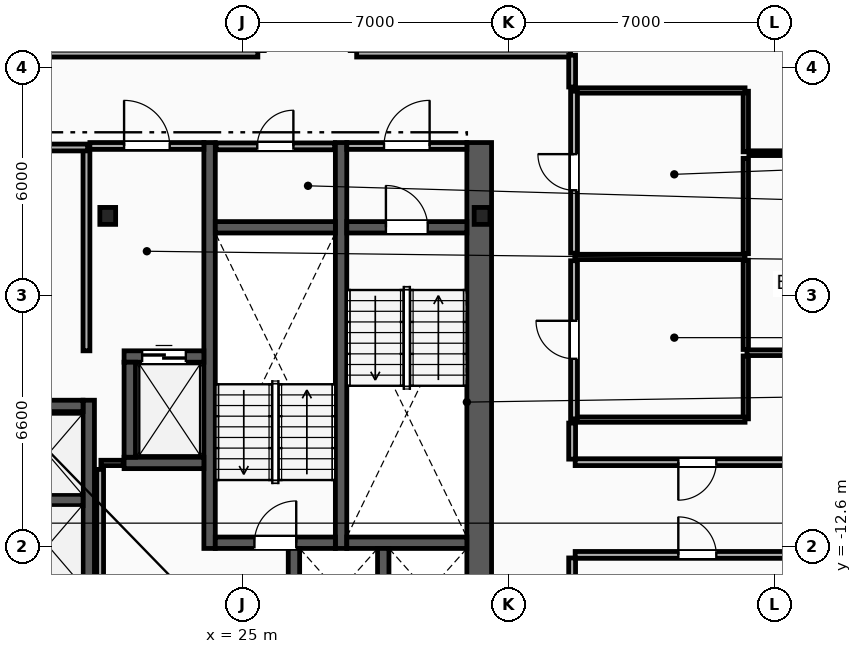
"""IFC4 building model, lengths in metres.
Left out: names, types, materials, properties, quantities, classifications, styles, units other than length and angle.
Written with IfcOpenShell. Run it as: python <this file> out.ifc"""

import sys

from ifc_helpers import new_model, si_unit, direction, frame, frame_2d, origin, origin_2d, place, context, subcontext, project, spatial, rectangle, i_section, extrude, element, fill, save


model = new_model("IFC4")
c1 = context("Model", 3, precision=1e-05, world=origin(), true_north=direction((0.0, 1.0)))
c2 = subcontext(c1, "Body", "Model", "MODEL_VIEW")
j1 = project(units=[si_unit("LENGTHUNIT", "METRE"), si_unit("PLANEANGLEUNIT", "RADIAN")], contexts=[c1])
p1 = place(None, origin())
s1 = spatial("IfcSite", under=j1, at=p1, CompositionType="ELEMENT")
p2 = place(p1, origin())
s2 = spatial("IfcBuilding", under=s1, at=p2, CompositionType="ELEMENT")
p3 = place(p2, frame((0.0, 0.0, 213.4)))
s3 = spatial("IfcBuildingStorey", under=s2, at=p3, CompositionType="ELEMENT", Elevation=213.4)
for number, where, z_axis, x_axis in (
    (1, (31.3, -3.9, 0.0), (0.0, 0.0, 1.0), (1.0, 0.0, 0.0)),
    (2, (21.45, -3.9, 0.0), (0.0, 0.0, 1.0), (1.0, 0.0, 0.0)),
):
    element("IfcColumn", number, at=place(p3, frame(where, z_axis=z_axis, x_axis=x_axis)), inside=s3, PredefinedType="COLUMN", context=c2, shape_type="SweptSolid", body=[
        extrude(i_section(OverallWidth=0.416, OverallDepth=0.446, WebThickness=0.039, FlangeThickness=0.063, FilletRadius=0.018, at=origin_2d()), origin(), (0.0, 0.0, 1.0), 3.6),
    ])
p4 = place(p3, frame((31.225, -15.3, 0.0), z_axis=(0.0, 0.0, 1.0), x_axis=(0.0, 1.0, 0.0)))
e3 = element("IfcWall", 3, at=p4, inside=s3, PredefinedType="SHEAR", context=c2, shape_type="SweptSolid", body=[
    extrude(rectangle(XDim=13.33, YDim=0.65, at=frame_2d((6.665, 0.0))), origin(), (0.0, 0.0, 1.0), 3.34),
])
for number, where, z_axis, x_axis in (
    (4, (27.59, -12.65, 0.0), (0.0, 0.0, 1.0), (0.0, 1.0, 0.0)),
    (5, (24.13, -12.65, 0.0), (0.0, 0.0, 1.0), (0.0, 1.0, 0.0)),
):
    element("IfcWall", number, at=place(p3, frame(where, z_axis=z_axis, x_axis=x_axis)), inside=s3, PredefinedType="SHEAR", context=c2, shape_type="SweptSolid", body=[
        extrude(rectangle(XDim=10.68, YDim=0.3, at=frame_2d((5.34, 0.0))), origin(), (0.0, 0.0, 1.0), 3.34),
    ])
p5 = place(p3, frame((27.74, -4.2, 0.0), z_axis=(0.0, 0.0, 1.0), x_axis=(1.0, 0.0, 0.0)))
e6 = element("IfcWall", 6, at=p5, inside=s3, PredefinedType="SHEAR", context=c2, shape_type="SweptSolid", body=[
    extrude(rectangle(XDim=3.16, YDim=0.3, at=frame_2d((1.58, 0.0))), origin(), (0.0, 0.0, 1.0), 3.34),
])
p6 = place(p5, frame((1.03, 0.0, 0.0)))
e7 = element("IfcOpeningElement", 7, at=p6, cuts=e6, PredefinedType="OPENING", context=c2, shape_type="SweptSolid", body=[
    extrude(rectangle(XDim=1.1, YDim=2.15, at=frame_2d((0.55, 1.075))), frame((0.0, 0.16, 0.0), z_axis=(0.0, -1.0, 0.0), x_axis=(1.0, 0.0, 0.0)), (0.0, 0.0, 1.0), 0.32),
])
p7 = place(p3, frame((27.74, -12.5, 0.0), z_axis=(0.0, 0.0, 1.0), x_axis=(1.0, 0.0, 0.0)))
e8 = element("IfcWall", 8, at=p7, inside=s3, PredefinedType="SHEAR", context=c2, shape_type="SweptSolid", body=[
    extrude(rectangle(XDim=3.16, YDim=0.3, at=frame_2d((1.58, 0.0))), origin(), (0.0, 0.0, 1.0), 3.34),
])
p8 = place(p3, frame((24.28, -12.5, 0.0), z_axis=(0.0, 0.0, 1.0), x_axis=(1.0, 0.0, 0.0)))
e9 = element("IfcWall", 9, at=p8, inside=s3, PredefinedType="SHEAR", context=c2, shape_type="SweptSolid", body=[
    extrude(rectangle(XDim=3.16, YDim=0.3, at=frame_2d((1.58, 0.0))), origin(), (0.0, 0.0, 1.0), 3.34),
])
p9 = place(p8, frame((1.03, 0.0, 0.0)))
e10 = element("IfcOpeningElement", 10, at=p9, cuts=e9, PredefinedType="OPENING", context=c2, shape_type="SweptSolid", body=[
    extrude(rectangle(XDim=1.1, YDim=2.15, at=frame_2d((0.55, 1.075))), frame((0.0, 0.16, 0.0), z_axis=(0.0, -1.0, 0.0), x_axis=(1.0, 0.0, 0.0)), (0.0, 0.0, 1.0), 0.32),
])
p10 = place(p3, frame((24.28, -4.2, 0.0), z_axis=(0.0, 0.0, 1.0), x_axis=(1.0, 0.0, 0.0)))
e11 = element("IfcWall", 11, at=p10, inside=s3, PredefinedType="SHEAR", context=c2, shape_type="SweptSolid", body=[
    extrude(rectangle(XDim=3.16, YDim=0.3, at=frame_2d((1.58, 0.0))), origin(), (0.0, 0.0, 1.0), 3.34),
])
p11 = place(p3, frame((20.89, -7.45, 0.0), z_axis=(0.0, 0.0, 1.0), x_axis=(0.0, 1.0, 0.0)))
e12 = element("IfcWall", 12, at=p11, inside=s3, PredefinedType="PARTITIONING", context=c2, shape_type="SweptSolid", body=[
    extrude(rectangle(XDim=5.3, YDim=0.18, at=frame_2d((2.65, 0.0))), origin(), (0.0, 0.0, 1.0), 3.34),
])
p12 = place(p3, frame((20.98, -2.06, 0.0), z_axis=(0.0, 0.0, 1.0), x_axis=(1.0, 0.0, 0.0)))
e13 = element("IfcWall", 13, at=p12, inside=s3, PredefinedType="PARTITIONING", context=c2, shape_type="SweptSolid", body=[
    extrude(rectangle(XDim=3.0, YDim=0.18, at=frame_2d((1.5, 0.0))), origin(), (0.0, 0.0, 1.0), 3.34),
])
p13 = place(p12, frame((0.9, 0.0, 0.0)))
e14 = element("IfcOpeningElement", 14, at=p13, cuts=e13, PredefinedType="OPENING", context=c2, shape_type="SweptSolid", body=[
    extrude(rectangle(XDim=1.2, YDim=2.15, at=frame_2d((0.6, 1.075))), frame((0.0, 0.1, 0.0), z_axis=(0.0, -1.0, 0.0), x_axis=(1.0, 0.0, 0.0)), (0.0, 0.0, 1.0), 0.2),
])
p14 = place(p3, frame((27.74, -2.06, 0.0), z_axis=(0.0, 0.0, 1.0), x_axis=(1.0, 0.0, 0.0)))
e15 = element("IfcWall", 15, at=p14, inside=s3, PredefinedType="PARTITIONING", context=c2, shape_type="SweptSolid", body=[
    extrude(rectangle(XDim=3.16, YDim=0.18, at=frame_2d((1.58, 0.0))), origin(), (0.0, 0.0, 1.0), 3.34),
])
p15 = place(p14, frame((0.98, 0.0, 0.0)))
e16 = element("IfcOpeningElement", 16, at=p15, cuts=e15, PredefinedType="OPENING", context=c2, shape_type="SweptSolid", body=[
    extrude(rectangle(XDim=1.2, YDim=2.15, at=frame_2d((0.6, 1.075))), frame((0.0, 0.1, 0.0), z_axis=(0.0, -1.0, 0.0), x_axis=(1.0, 0.0, 0.0)), (0.0, 0.0, 1.0), 0.2),
])
p16 = place(p3, frame((21.88, -7.6, 0.0), z_axis=(0.0, 0.0, 1.0), x_axis=(1.0, 0.0, 0.0)))
e17 = element("IfcWall", 17, at=p16, inside=s3, PredefinedType="SHEAR", context=c2, shape_type="SweptSolid", body=[
    extrude(rectangle(XDim=2.1, YDim=0.3, at=frame_2d((1.05, 0.0))), origin(), (0.0, 0.0, 1.0), 3.34),
])
p17 = place(p16, frame((0.475, 0.0, 0.0)))
e18 = element("IfcOpeningElement", 18, at=p17, cuts=e17, PredefinedType="OPENING", context=c2, shape_type="SweptSolid", body=[
    extrude(rectangle(XDim=1.15, YDim=2.2, at=frame_2d((0.575, 1.1))), frame((0.0, 0.16, 0.0), z_axis=(0.0, -1.0, 0.0), x_axis=(1.0, 0.0, 0.0)), (0.0, 0.0, 1.0), 0.32),
])
p18 = place(p3, frame((21.88, -10.4, 0.0), z_axis=(0.0, 0.0, 1.0), x_axis=(1.0, 0.0, 0.0)))
e19 = element("IfcWall", 19, at=p18, inside=s3, PredefinedType="SHEAR", context=c2, shape_type="SweptSolid", body=[
    extrude(rectangle(XDim=2.1, YDim=0.3, at=frame_2d((1.05, 0.0))), origin(), (0.0, 0.0, 1.0), 3.34),
])
p19 = place(p3, frame((22.03, -10.25, 0.0), z_axis=(0.0, 0.0, 1.0), x_axis=(0.0, 1.0, 0.0)))
e20 = element("IfcWall", 20, at=p19, inside=s3, PredefinedType="SHEAR", context=c2, shape_type="SweptSolid", body=[
    extrude(rectangle(XDim=2.5, YDim=0.3, at=frame_2d((1.25, 0.0))), origin(), (0.0, 0.0, 1.0), 3.34),
])
for number, where, z_axis, x_axis in (
    (21, (28.7, -14.95, 0.0), (0.0, 0.0, 1.0), (0.0, 1.0, 0.0)),
    (22, (26.35, -14.95, 0.0), (0.0, 0.0, 1.0), (0.0, 1.0, 0.0)),
):
    element("IfcWall", number, at=place(p3, frame(where, z_axis=z_axis, x_axis=x_axis)), inside=s3, PredefinedType="SHEAR", context=c2, shape_type="SweptSolid", body=[
        extrude(rectangle(XDim=2.3, YDim=0.3, at=frame_2d((1.15, 0.0))), origin(), (0.0, 0.0, 1.0), 3.34),
    ])
p20 = place(p3, frame((20.95, -14.0, 0.0), z_axis=(0.0, 0.0, 1.0), x_axis=(0.0, 1.0, 0.0)))
e23 = element("IfcWall", 23, at=p20, inside=s3, PredefinedType="SHEAR", context=c2, shape_type="SweptSolid", body=[
    extrude(rectangle(XDim=5.25, YDim=0.3, at=frame_2d((2.625, 0.0))), origin(), (0.0, 0.0, 1.0), 3.34),
])
p21 = place(p3, frame((18.65, -8.9, 0.0), z_axis=(0.0, 0.0, 1.0), x_axis=(1.0, 0.0, 0.0)))
e24 = element("IfcWall", 24, at=p21, inside=s3, PredefinedType="SHEAR", context=c2, shape_type="SweptSolid", body=[
    extrude(rectangle(XDim=2.15, YDim=0.3, at=frame_2d((1.075, 0.0))), origin(), (0.0, 0.0, 1.0), 3.34),
])
p22 = place(p3, frame((18.95, -11.375, 0.0), z_axis=(0.0, 0.0, 1.0), x_axis=(1.0, 0.0, 0.0)))
e25 = element("IfcWall", 25, at=p22, inside=s3, PredefinedType="SHEAR", context=c2, shape_type="SweptSolid", body=[
    extrude(rectangle(XDim=1.85, YDim=0.3, at=frame_2d((0.925, 0.0))), origin(), (0.0, 0.0, 1.0), 3.34),
])
p23 = place(p3, frame((21.27, -10.4, 0.0), z_axis=(0.0, 0.0, 1.0), x_axis=(1.0, 0.0, 0.0)))
e26 = element("IfcWall", 26, at=p23, inside=s3, PredefinedType="PARTITIONING", context=c2, shape_type="SweptSolid", body=[
    extrude(rectangle(XDim=0.59, YDim=0.14, at=frame_2d((0.295, 0.0))), origin(), (0.0, 0.0, 1.0), 3.34),
])
p24 = place(p3, frame((21.25, -14.93, 0.0), z_axis=(0.0, 0.0, 1.0), x_axis=(0.0, 1.0, 0.0)))
e27 = element("IfcWall", 27, at=p24, inside=s3, PredefinedType="PARTITIONING", context=c2, shape_type="SweptSolid", body=[
    extrude(rectangle(XDim=4.36, YDim=0.18, at=frame_2d((2.18, 0.0))), origin(), (0.0, 0.0, 1.0), 3.34),
])
p25 = place(p3, frame((24.3, -2.07, 0.0), z_axis=(0.0, 0.0, 1.0), x_axis=(1.0, 0.0, 0.0)))
e28 = element("IfcWall", 28, at=p25, inside=s3, PredefinedType="PARTITIONING", context=c2, shape_type="SweptSolid", body=[
    extrude(rectangle(XDim=3.12, YDim=0.18, at=frame_2d((1.56, 0.0))), origin(), (0.0, 0.0, 1.0), 3.34),
])
p26 = place(p25, frame((1.085, 0.0, 0.0)))
e29 = element("IfcOpeningElement", 29, at=p26, cuts=e28, PredefinedType="OPENING", context=c2, shape_type="SweptSolid", body=[
    extrude(rectangle(XDim=0.95, YDim=2.1, at=frame_2d((0.475, 1.05))), frame((0.0, 0.1, 0.0), z_axis=(0.0, -1.0, 0.0), x_axis=(1.0, 0.0, 0.0)), (0.0, 0.0, 1.0), 0.2),
])
p27 = place(p3, frame((38.24, -9.24, 0.0), z_axis=(0.0, 0.0, 1.0), x_axis=(0.0, 1.0, 0.0)))
e30 = element("IfcWall", 30, at=p27, inside=s3, PredefinedType="PARTITIONING", context=c2, shape_type="SweptSolid", body=[
    extrude(rectangle(XDim=1.655, YDim=0.14, at=frame_2d((0.828, 0.0))), origin(), (0.0, 0.0, 1.0), 3.34),
])
p28 = place(p3, frame((38.24, -7.415, 0.0), z_axis=(0.0, 0.0, 1.0), x_axis=(0.0, 1.0, 0.0)))
e31 = element("IfcWall", 31, at=p28, inside=s3, PredefinedType="PARTITIONING", context=c2, shape_type="SweptSolid", body=[
    extrude(rectangle(XDim=2.35, YDim=0.14, at=frame_2d((1.175, 0.0))), origin(), (0.0, 0.0, 1.0), 3.34),
])
p29 = place(p3, frame((38.24, -4.895, 0.0), z_axis=(0.0, 0.0, 1.0), x_axis=(0.0, 1.0, 0.0)))
e32 = element("IfcWall", 32, at=p29, inside=s3, PredefinedType="PARTITIONING", context=c2, shape_type="SweptSolid", body=[
    extrude(rectangle(XDim=2.51, YDim=0.14, at=frame_2d((1.255, 0.0))), origin(), (0.0, 0.0, 1.0), 3.34),
])
p30 = place(p3, frame((38.24, -2.215, 0.0), z_axis=(0.0, 0.0, 1.0), x_axis=(0.0, 1.0, 0.0)))
e33 = element("IfcWall", 33, at=p30, inside=s3, PredefinedType="PARTITIONING", context=c2, shape_type="SweptSolid", body=[
    extrude(rectangle(XDim=1.595, YDim=0.14, at=frame_2d((0.797, 0.0))), origin(), (0.0, 0.0, 1.0), 3.34),
])
for number, where, z_axis, x_axis in (
    (34, (33.74, -0.6, 0.0), (0.0, 0.0, 1.0), (1.0, 0.0, 0.0)),
    (35, (33.74, -4.98, 0.0), (0.0, 0.0, 1.0), (1.0, 0.0, 0.0)),
    (36, (33.74, -9.26, 0.0), (0.0, 0.0, 1.0), (1.0, 0.0, 0.0)),
):
    element("IfcWall", number, at=place(p3, frame(where, z_axis=z_axis, x_axis=x_axis)), inside=s3, PredefinedType="PARTITIONING", context=c2, shape_type="SweptSolid", body=[
        extrude(rectangle(XDim=4.48, YDim=0.14, at=frame_2d((2.24, 0.0))), origin(), (0.0, 0.0, 1.0), 3.34),
    ])
p31 = place(p3, frame((33.72, -4.88, 0.0), z_axis=(0.0, 0.0, 1.0), x_axis=(0.0, 1.0, 0.0)))
e37 = element("IfcWall", 37, at=p31, inside=s3, PredefinedType="PARTITIONING", context=c2, shape_type="SweptSolid", body=[
    extrude(rectangle(XDim=4.26, YDim=0.18, at=frame_2d((2.13, 0.0))), origin(), (0.0, 0.0, 1.0), 3.34),
])
p32 = place(p31, frame((1.655, 0.0, 0.0)))
e38 = element("IfcOpeningElement", 38, at=p32, cuts=e37, PredefinedType="OPENING", context=c2, shape_type="SweptSolid", body=[
    extrude(rectangle(XDim=0.95, YDim=2.1, at=frame_2d((0.475, 1.05))), frame((0.0, 0.1, 0.0), z_axis=(0.0, -1.0, 0.0), x_axis=(1.0, 0.0, 0.0)), (0.0, 0.0, 1.0), 0.2),
])
p33 = place(p3, frame((33.72, -9.24, 0.0), z_axis=(0.0, 0.0, 1.0), x_axis=(0.0, 1.0, 0.0)))
e39 = element("IfcWall", 39, at=p33, inside=s3, PredefinedType="PARTITIONING", context=c2, shape_type="SweptSolid", body=[
    extrude(rectangle(XDim=4.16, YDim=0.18, at=frame_2d((2.08, 0.0))), origin(), (0.0, 0.0, 1.0), 3.34),
])
p34 = place(p33, frame((1.58, 0.0, 0.0)))
e40 = element("IfcOpeningElement", 40, at=p34, cuts=e39, PredefinedType="OPENING", context=c2, shape_type="SweptSolid", body=[
    extrude(rectangle(XDim=1.0, YDim=2.15, at=frame_2d((0.5, 1.075))), frame((0.0, 0.1, 0.0), z_axis=(0.0, -1.0, 0.0), x_axis=(1.0, 0.0, 0.0)), (0.0, 0.0, 1.0), 0.2),
])
p35 = place(p3, frame((38.27, -7.5, 0.0), z_axis=(0.0, 0.0, 1.0), x_axis=(1.0, 0.0, 0.0)))
e41 = element("IfcWall", 41, at=p35, inside=s3, PredefinedType="PARTITIONING", context=c2, shape_type="SweptSolid", body=[
    extrude(rectangle(XDim=12.438, YDim=0.15, at=frame_2d((6.219, 0.0))), origin(), (0.0, 0.0, 1.0), 3.34),
])
p36 = place(p3, frame((33.75, -12.82, 0.0), z_axis=(0.0, 0.0, 1.0), x_axis=(1.0, 0.0, 0.0)))
e42 = element("IfcWall", 42, at=p36, inside=s3, PredefinedType="PARTITIONING", context=c2, shape_type="SweptSolid", body=[
    extrude(rectangle(XDim=6.428, YDim=0.18, at=frame_2d((3.214, 0.0))), origin(), (0.0, 0.0, 1.0), 3.34),
])
p37 = place(p36, frame((2.714, 0.0, 0.0)))
e43 = element("IfcOpeningElement", 43, at=p37, cuts=e42, PredefinedType="OPENING", context=c2, shape_type="SweptSolid", body=[
    extrude(rectangle(XDim=1.0, YDim=2.15, at=frame_2d((0.5, 1.075))), frame((0.0, 0.1, 0.0), z_axis=(0.0, -1.0, 0.0), x_axis=(1.0, 0.0, 0.0)), (0.0, 0.0, 1.0), 0.2),
])
p38 = place(p3, frame((33.67, -17.43, 0.0), z_axis=(0.0, 0.0, 1.0), x_axis=(0.0, 1.0, 0.0)))
e44 = element("IfcWall", 44, at=p38, inside=s3, PredefinedType="PARTITIONING", context=c2, shape_type="SweptSolid", body=[
    extrude(rectangle(XDim=4.53, YDim=0.18, at=frame_2d((2.265, 0.0))), origin(), (0.0, 0.0, 1.0), 3.34),
])
p39 = place(p3, frame((40.178, -10.38, 0.0), z_axis=(0.0, 0.0, 1.0), x_axis=(-1.0, 0.0, 0.0)))
e45 = element("IfcWall", 45, at=p39, inside=s3, PredefinedType="PARTITIONING", context=c2, shape_type="SweptSolid", body=[
    extrude(rectangle(XDim=6.428, YDim=0.18, at=frame_2d((3.214, 0.0))), origin(), (0.0, 0.0, 1.0), 3.34),
])
p40 = place(p39, frame((2.714, 0.0, 0.0)))
e46 = element("IfcOpeningElement", 46, at=p40, cuts=e45, PredefinedType="OPENING", context=c2, shape_type="SweptSolid", body=[
    extrude(rectangle(XDim=1.0, YDim=2.15, at=frame_2d((0.5, 1.075))), frame((0.0, 0.1, 0.0), z_axis=(0.0, -1.0, 0.0), x_axis=(1.0, 0.0, 0.0)), (0.0, 0.0, 1.0), 0.2),
])
p41 = place(p3, frame((33.67, -10.3, 0.0), z_axis=(0.0, 0.0, 1.0), x_axis=(0.0, 1.0, 0.0)))
e47 = element("IfcWall", 47, at=p41, inside=s3, PredefinedType="PARTITIONING", context=c2, shape_type="SweptSolid", body=[
    extrude(rectangle(XDim=0.949, YDim=0.18, at=frame_2d((0.474, 0.0))), origin(), (0.0, 0.0, 1.0), 3.34),
])
p42 = place(p3, frame((25.4, 0.37, 0.0), z_axis=(0.0, 0.0, 1.0), x_axis=(-1.0, 0.0, 0.0)))
e48 = element("IfcWall", 48, at=p42, inside=s3, PredefinedType="PARTITIONING", context=c2, shape_type="SweptSolid", body=[
    extrude(rectangle(XDim=8.578, YDim=0.18, at=frame_2d((4.289, 0.0))), origin(), (0.0, 0.0, 1.0), 3.34),
])
p43 = place(p3, frame((16.822, -2.1, 0.0), z_axis=(0.0, 0.0, 1.0), x_axis=(1.0, 0.0, 0.0)))
e49 = element("IfcWall", 49, at=p43, inside=s3, PredefinedType="PARTITIONING", context=c2, shape_type="SweptSolid", body=[
    extrude(rectangle(XDim=4.098, YDim=0.18, at=frame_2d((2.049, 0.0))), origin(), (0.0, 0.0, 1.0), 3.34),
])
p44 = place(p3, frame((33.628, 0.37, 0.0), z_axis=(0.0, 0.0, 1.0), x_axis=(-1.0, 0.0, 0.0)))
e50 = element("IfcWall", 50, at=p44, inside=s3, PredefinedType="PARTITIONING", context=c2, shape_type="SweptSolid", body=[
    extrude(rectangle(XDim=5.628, YDim=0.18, at=frame_2d((2.814, 0.0))), origin(), (0.0, 0.0, 1.0), 3.34),
])
p45 = place(p3, frame((33.67, -0.509, 0.0), z_axis=(0.0, 0.0, 1.0), x_axis=(0.0, 1.0, 0.0)))
e51 = element("IfcWall", 51, at=p45, inside=s3, PredefinedType="PARTITIONING", context=c2, shape_type="SweptSolid", body=[
    extrude(rectangle(XDim=0.837, YDim=0.18, at=frame_2d((0.418, 0.0))), origin(), (0.0, 0.0, 1.0), 3.34),
])
p46 = place(p3, frame((38.32, -2.25, 0.0), z_axis=(0.0, 0.0, 1.0), x_axis=(1.0, 0.0, 0.0)))
e52 = element("IfcWall", 52, at=p46, inside=s3, PredefinedType="PARTITIONING", context=c2, shape_type="SweptSolid", body=[
    extrude(rectangle(XDim=12.729, YDim=0.125, at=frame_2d((6.365, 0.0))), origin(), (0.0, 0.0, 1.0), 3.34),
])
p47 = place(p46, frame((5.865, 0.0, 0.0)))
e53 = element("IfcOpeningElement", 53, at=p47, cuts=e52, PredefinedType="OPENING", context=c2, shape_type="SweptSolid", body=[
    extrude(rectangle(XDim=1.0, YDim=2.15, at=frame_2d((0.5, 1.075))), frame((0.0, 0.073, 0.0), z_axis=(0.0, -1.0, 0.0), x_axis=(1.0, 0.0, 0.0)), (0.0, 0.0, 1.0), 0.145),
])
p48 = place(p6, origin())
e54 = element("IfcDoor", 54, at=p48, inside=s3, OperationType="SINGLE_SWING_LEFT", PredefinedType="DOOR", context=c2, shape_type="SweptSolid", body=[
    extrude(rectangle(XDim=1.1, YDim=2.15, at=frame_2d((0.55, 1.075))), frame((0.0, 0.025, 0.0), z_axis=(0.0, -1.0, 0.0), x_axis=(1.0, 0.0, 0.0)), (0.0, 0.0, 1.0), 0.05),
])
fill(e7, e54)
p49 = place(p9, origin())
e55 = element("IfcDoor", 55, at=p49, inside=s3, OperationType="SINGLE_SWING_RIGHT", PredefinedType="DOOR", context=c2, shape_type="SweptSolid", body=[
    extrude(rectangle(XDim=1.1, YDim=2.15, at=frame_2d((0.55, 1.075))), frame((0.0, 0.025, 0.0), z_axis=(0.0, -1.0, 0.0), x_axis=(1.0, 0.0, 0.0)), (0.0, 0.0, 1.0), 0.05),
])
fill(e10, e55)
p50 = place(p13, origin())
e56 = element("IfcDoor", 56, at=p50, inside=s3, OperationType="SINGLE_SWING_LEFT", PredefinedType="DOOR", context=c2, shape_type="SweptSolid", body=[
    extrude(rectangle(XDim=1.2, YDim=2.15, at=frame_2d((0.6, 1.075))), frame((0.0, 0.025, 0.0), z_axis=(0.0, -1.0, 0.0), x_axis=(1.0, 0.0, 0.0)), (0.0, 0.0, 1.0), 0.05),
])
fill(e14, e56)
p51 = place(p15, origin())
e57 = element("IfcDoor", 57, at=p51, inside=s3, OperationType="SINGLE_SWING_RIGHT", PredefinedType="DOOR", context=c2, shape_type="SweptSolid", body=[
    extrude(rectangle(XDim=1.2, YDim=2.15, at=frame_2d((0.6, 1.075))), frame((0.0, 0.025, 0.0), z_axis=(0.0, -1.0, 0.0), x_axis=(1.0, 0.0, 0.0)), (0.0, 0.0, 1.0), 0.05),
])
fill(e16, e57)
p52 = place(p17, origin())
e58 = element("IfcDoor", 58, at=p52, inside=s3, OperationType="SLIDING_TO_LEFT", PredefinedType="TRAPDOOR", context=c2, shape_type="SweptSolid", body=[
    extrude(rectangle(XDim=1.15, YDim=2.2, at=frame_2d((0.575, 1.1))), frame((0.0, 0.025, 0.0), z_axis=(0.0, -1.0, 0.0), x_axis=(1.0, 0.0, 0.0)), (0.0, 0.0, 1.0), 0.05),
])
fill(e18, e58)
p53 = place(p37, origin())
e59 = element("IfcDoor", 59, at=p53, inside=s3, OperationType="SINGLE_SWING_LEFT", PredefinedType="DOOR", context=c2, shape_type="SweptSolid", body=[
    extrude(rectangle(XDim=1.0, YDim=2.15, at=frame_2d((0.5, 1.075))), frame((0.0, 0.025, 0.0), z_axis=(0.0, -1.0, 0.0), x_axis=(1.0, 0.0, 0.0)), (0.0, 0.0, 1.0), 0.05),
])
fill(e43, e59)
p54 = place(p40, origin())
e60 = element("IfcDoor", 60, at=p54, inside=s3, OperationType="SINGLE_SWING_RIGHT", PredefinedType="DOOR", context=c2, shape_type="SweptSolid", body=[
    extrude(rectangle(XDim=1.0, YDim=2.15, at=frame_2d((0.5, 1.075))), frame((0.0, 0.025, 0.0), z_axis=(0.0, -1.0, 0.0), x_axis=(1.0, 0.0, 0.0)), (0.0, 0.0, 1.0), 0.05),
])
fill(e46, e60)
p55 = place(p32, origin())
e61 = element("IfcDoor", 61, at=p55, inside=s3, OperationType="SINGLE_SWING_RIGHT", PredefinedType="DOOR", context=c2, shape_type="SweptSolid", body=[
    extrude(rectangle(XDim=0.95, YDim=2.1, at=frame_2d((0.475, 1.05))), frame((0.0, 0.025, 0.0), z_axis=(0.0, -1.0, 0.0), x_axis=(1.0, 0.0, 0.0)), (0.0, 0.0, 1.0), 0.05),
])
fill(e38, e61)
p56 = place(p34, origin())
e62 = element("IfcDoor", 62, at=p56, inside=s3, OperationType="SINGLE_SWING_RIGHT", PredefinedType="DOOR", context=c2, shape_type="SweptSolid", body=[
    extrude(rectangle(XDim=1.0, YDim=2.15, at=frame_2d((0.5, 1.075))), frame((0.0, 0.025, 0.0), z_axis=(0.0, -1.0, 0.0), x_axis=(1.0, 0.0, 0.0)), (0.0, 0.0, 1.0), 0.05),
])
fill(e40, e62)
p57 = place(p26, origin())
e63 = element("IfcDoor", 63, at=p57, inside=s3, OperationType="SINGLE_SWING_RIGHT", PredefinedType="DOOR", context=c2, shape_type="SweptSolid", body=[
    extrude(rectangle(XDim=0.95, YDim=2.1, at=frame_2d((0.475, 1.05))), frame((0.0, 0.025, 0.0), z_axis=(0.0, -1.0, 0.0), x_axis=(1.0, 0.0, 0.0)), (0.0, 0.0, 1.0), 0.05),
])
fill(e29, e63)
save(model, sys.argv[1])
